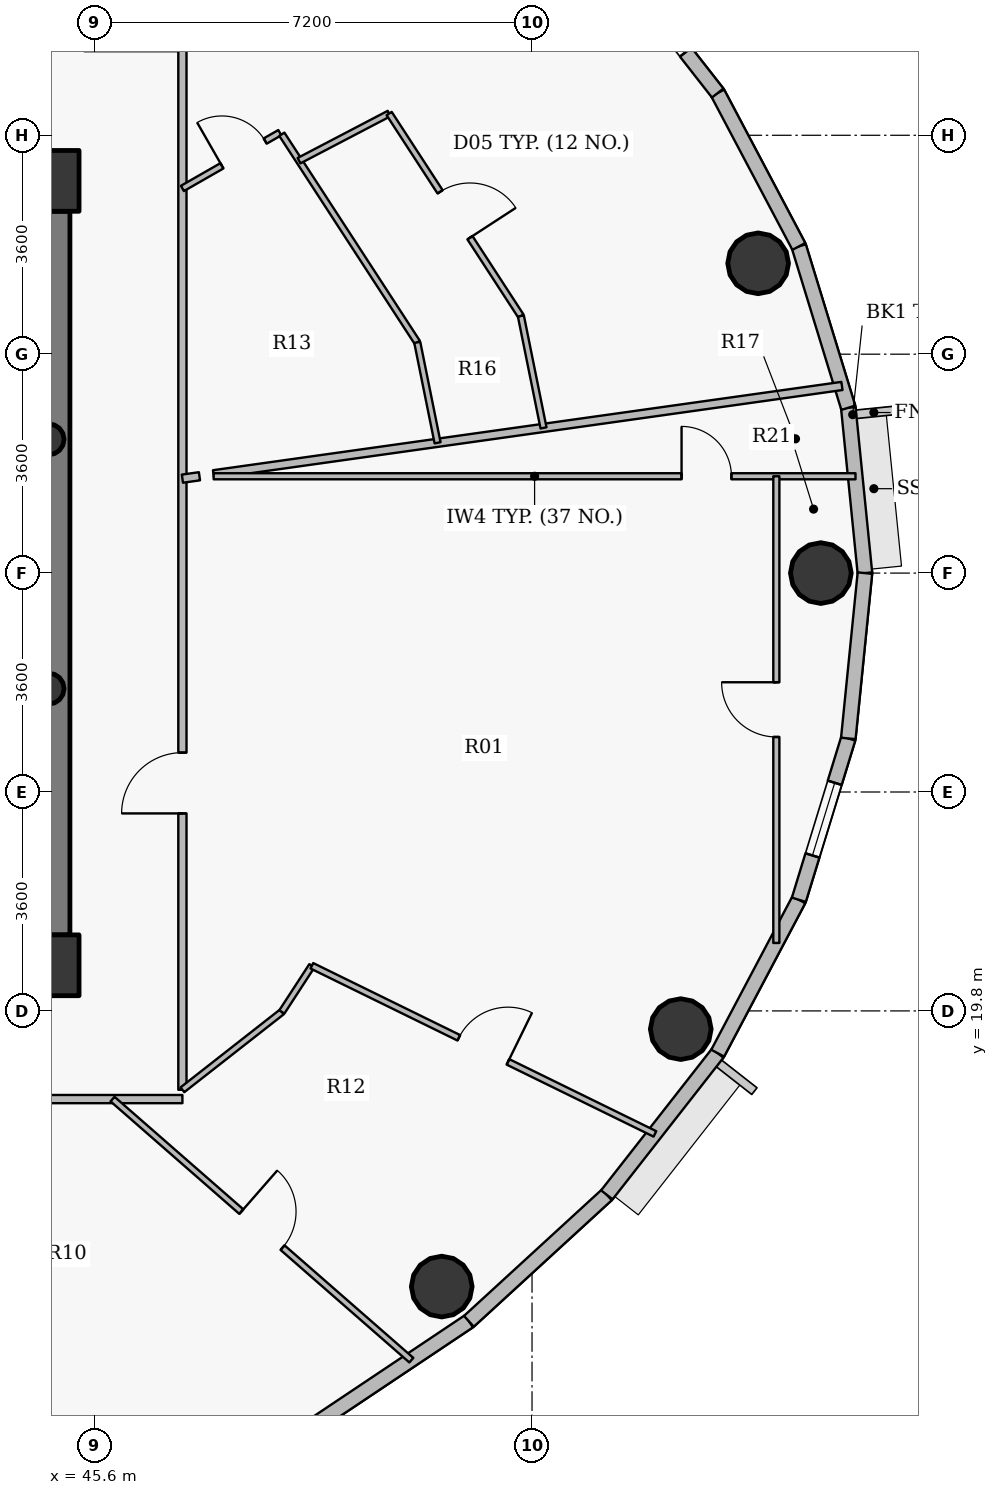
"""IFC4 building model, lengths in metres.
Left out: names, types, materials, properties, quantities, classifications, styles, units other than length and angle.
Written with IfcOpenShell. Run it as: python <this file> out.ifc"""

import sys

from ifc_helpers import new_model, si_unit, direction, frame, frame_2d, origin, origin_2d, place, context, subcontext, project, spatial, rectangle, hollow_circle, extrude, source, transform, mapped, element, fill, save


model = new_model("IFC4")
c1 = context("Model", 3, precision=1e-05, world=origin(), true_north=direction((0.0, 1.0)))
c2 = subcontext(c1, "Body", "Model", "MODEL_VIEW")
j1 = project(units=[si_unit("LENGTHUNIT", "METRE"), si_unit("PLANEANGLEUNIT", "RADIAN")], contexts=[c1])
p1 = place(None, origin())
s1 = spatial("IfcSite", under=j1, at=p1, CompositionType="ELEMENT")
p2 = place(p1, origin())
s2 = spatial("IfcBuilding", under=s1, at=p2, CompositionType="ELEMENT")
p3 = place(p2, frame((0.0, 0.0, 276.75)))
s3 = spatial("IfcBuildingStorey", under=s2, at=p3, CompositionType="ELEMENT", Elevation=276.75)
for number, where, z_axis, x_axis in (
    (1, (44.85, 20.55, 0.0), (0.0, 0.0, 1.0), (1.0, 0.0, 0.0)),
    (2, (44.85, 33.45, 0.0), (0.0, 0.0, 1.0), (1.0, 0.0, 0.0)),
):
    element("IfcColumn", number, at=place(p3, frame(where, z_axis=z_axis, x_axis=x_axis)), inside=s3, PredefinedType="COLUMN", context=c2, shape_type="SweptSolid", body=[
        extrude(rectangle(XDim=1.0, YDim=1.0, at=origin_2d()), origin(), (0.0, 0.0, 1.0), 3.75),
    ])
p4 = place(p3, frame((44.85, 32.95, 0.0), z_axis=(0.0, 0.0, 1.0), x_axis=(0.0, -1.0, 0.0)))
e3 = element("IfcWall", 3, at=p4, inside=s3, PredefinedType="SHEAR", context=c2, shape_type="SweptSolid", body=[
    extrude(rectangle(XDim=11.9, YDim=0.7, at=frame_2d((5.95, 0.0))), origin(), (0.0, 0.0, 1.0), 3.05),
])
for number, where, z_axis, x_axis in (
    (4, (57.55, 27.0, 0.0), (0.0, 0.0, 1.0), (1.0, 0.0, 0.0)),
    (5, (56.519, 32.094, 0.0), (0.0, 0.0, 1.0), (1.0, 0.0, 0.0)),
    (6, (51.315, 15.267, 0.0), (0.0, 0.0, 1.0), (1.0, 0.0, 0.0)),
    (7, (55.246, 19.5, 0.0), (0.0, 0.0, 1.0), (1.0, 0.0, 0.0)),
):
    element("IfcColumn", number, at=place(p3, frame(where, z_axis=z_axis, x_axis=x_axis)), inside=s3, PredefinedType="COLUMN", context=c2, shape_type="SweptSolid", body=[
        extrude(hollow_circle(Radius=0.5, WallThickness=0.032, at=origin_2d()), origin(), (0.0, 0.0, 1.0), 3.75),
    ])
for number, where, z_axis, x_axis in (
    (8, (44.85, 25.1, 0.0), (0.0, 0.0, 1.0), (1.0, 0.0, 0.0)),
    (9, (44.85, 29.2, 0.0), (0.0, 0.0, 1.0), (1.0, 0.0, 0.0)),
):
    element("IfcColumn", number, at=place(p3, frame(where, z_axis=z_axis, x_axis=x_axis)), inside=s3, PredefinedType="COLUMN", context=c2, shape_type="SweptSolid", body=[
        extrude(hollow_circle(Radius=0.254, WallThickness=0.02, at=origin_2d()), origin(), (0.0, 0.0, 1.0), 3.75),
    ])
p5 = place(p3, frame((58.002, 29.719, 0.0), z_axis=(0.0, 0.0, 1.0), x_axis=(0.099972526841, -0.99499019788, 0.0)))
e10 = element("IfcWall", 10, at=p5, inside=s3, PredefinedType="SOLIDWALL", context=c2, shape_type="SweptSolid", body=[
    extrude(rectangle(XDim=2.733, YDim=0.24, at=frame_2d((1.366, 0.0))), origin(), (0.0, 0.0, 1.0), 3.5),
])
p6 = place(p3, frame((57.188, 32.372, 0.0), z_axis=(0.0, 0.0, 1.0), x_axis=(0.2931213403, -0.956075248012, 0.0)))
e11 = element("IfcWall", 11, at=p6, inside=s3, PredefinedType="SOLIDWALL", context=c2, shape_type="SweptSolid", body=[
    extrude(rectangle(XDim=2.775, YDim=0.24, at=frame_2d((1.388, 0.0))), origin(), (0.0, 0.0, 1.0), 3.5),
])
p7 = place(p3, frame((55.854, 34.895, 0.0), z_axis=(0.0, 0.0, 1.0), x_axis=(0.467628269026, -0.883925224218, 0.0)))
e12 = element("IfcWall", 12, at=p7, inside=s3, PredefinedType="SOLIDWALL", context=c2, shape_type="SweptSolid", body=[
    extrude(rectangle(XDim=2.854, YDim=0.24, at=frame_2d((1.427, 0.0))), origin(), (0.0, 0.0, 1.0), 3.5),
])
p8 = place(p3, frame((54.03, 37.225, 0.0), z_axis=(0.0, 0.0, 1.0), x_axis=(0.616337186556, -0.787482363275, 0.0)))
e13 = element("IfcWall", 13, at=p8, inside=s3, PredefinedType="SOLIDWALL", context=c2, shape_type="SweptSolid", body=[
    extrude(rectangle(XDim=2.958, YDim=0.24, at=frame_2d((1.479, 0.0))), origin(), (0.0, 0.0, 1.0), 3.5),
])
p9 = place(p8, frame((0.854, 0.0, 0.9)))
e14 = element("IfcOpeningElement", 14, at=p9, cuts=e13, PredefinedType="OPENING", context=c2, shape_type="SweptSolid", body=[
    extrude(rectangle(XDim=1.25, YDim=1.65, at=origin_2d()), frame((0.625, 0.13, 0.825), z_axis=(0.0, -1.0, 0.0), x_axis=(1.0, 0.0, 0.0)), (0.0, 0.0, 1.0), 0.26),
])
p10 = place(p3, frame((51.762, 14.696, 0.0), z_axis=(0.0, 0.0, 1.0), x_axis=(-0.831250592635, -0.55589787933, 0.0)))
e15 = element("IfcWall", 15, at=p10, inside=s3, PredefinedType="SOLIDWALL", context=c2, shape_type="SweptSolid", body=[
    extrude(rectangle(XDim=3.197, YDim=0.24, at=frame_2d((1.599, 0.0))), origin(), (0.0, 0.0, 1.0), 3.5),
])
p11 = place(p3, frame((54.03, 16.775, 0.0), z_axis=(0.0, 0.0, 1.0), x_axis=(-0.737068506972, -0.675818034703, 0.0)))
e16 = element("IfcWall", 16, at=p11, inside=s3, PredefinedType="SOLIDWALL", context=c2, shape_type="SweptSolid", body=[
    extrude(rectangle(XDim=3.077, YDim=0.24, at=frame_2d((1.539, 0.0))), origin(), (0.0, 0.0, 1.0), 3.5),
])
p12 = place(p3, frame((55.854, 19.105, 0.0), z_axis=(0.0, 0.0, 1.0), x_axis=(-0.616337186556, -0.787482363275, 0.0)))
e17 = element("IfcWall", 17, at=p12, inside=s3, PredefinedType="SOLIDWALL", context=c2, shape_type="SweptSolid", body=[
    extrude(rectangle(XDim=2.958, YDim=0.24, at=frame_2d((1.479, 0.0))), origin(), (0.0, 0.0, 1.0), 3.5),
])
p13 = place(p3, frame((57.188, 21.628, 0.0), z_axis=(0.0, 0.0, 1.0), x_axis=(-0.467628269026, -0.883925224218, 0.0)))
e18 = element("IfcWall", 18, at=p13, inside=s3, PredefinedType="SOLIDWALL", context=c2, shape_type="SweptSolid", body=[
    extrude(rectangle(XDim=2.854, YDim=0.24, at=frame_2d((1.427, 0.0))), origin(), (0.0, 0.0, 1.0), 3.5),
])
p14 = place(p3, frame((58.002, 24.281, 0.0), z_axis=(0.0, 0.0, 1.0), x_axis=(-0.2931213403, -0.956075248012, 0.0)))
e19 = element("IfcWall", 19, at=p14, inside=s3, PredefinedType="SOLIDWALL", context=c2, shape_type="SweptSolid", body=[
    extrude(rectangle(XDim=2.775, YDim=0.24, at=frame_2d((1.388, 0.0))), origin(), (0.0, 0.0, 1.0), 3.5),
])
p15 = place(p14, frame((0.763, 0.0, 0.9)))
e20 = element("IfcOpeningElement", 20, at=p15, cuts=e19, PredefinedType="OPENING", context=c2, shape_type="SweptSolid", body=[
    extrude(rectangle(XDim=1.25, YDim=1.65, at=origin_2d()), frame((0.625, 0.13, 0.825), z_axis=(0.0, -1.0, 0.0), x_axis=(1.0, 0.0, 0.0)), (0.0, 0.0, 1.0), 0.26),
])
p16 = place(p3, frame((58.275, 27.0, 0.0), z_axis=(0.0, 0.0, 1.0), x_axis=(-0.099972526841, -0.99499019788, 0.0)))
e21 = element("IfcWall", 21, at=p16, inside=s3, PredefinedType="SOLIDWALL", context=c2, shape_type="SweptSolid", body=[
    extrude(rectangle(XDim=2.733, YDim=0.24, at=frame_2d((1.366, 0.0))), origin(), (0.0, 0.0, 1.0), 3.5),
])
p17 = place(p3, frame((36.95, 18.35, 0.0), z_axis=(0.0, 0.0, 1.0), x_axis=(1.0, 0.0, 0.0)))
e22 = element("IfcWall", 22, at=p17, inside=s3, PredefinedType="PARTITIONING", context=c2, shape_type="SweptSolid", body=[
    extrude(rectangle(XDim=10.1, YDim=0.135, at=frame_2d((5.05, 0.0))), origin(), (0.0, 0.0, 1.0), 3.035),
])
p18 = place(p17, frame((1.521, 0.0, 0.0)))
e23 = element("IfcOpeningElement", 23, at=p18, cuts=e22, PredefinedType="OPENING", context=c2, shape_type="SweptSolid", body=[
    extrude(rectangle(XDim=1.0, YDim=2.15, at=origin_2d()), frame((0.5, 0.078, 1.075), z_axis=(0.0, -1.0, 0.0), x_axis=(1.0, 0.0, 0.0)), (0.0, 0.0, 1.0), 0.155),
])
p19 = place(p3, frame((40.952, 18.35, 0.0), z_axis=(0.0, 0.0, 1.0), x_axis=(0.496803688517, -0.867862947173, 0.0)))
e24 = element("IfcWall", 24, at=p19, inside=s3, PredefinedType="PARTITIONING", context=c2, shape_type="SweptSolid", body=[
    extrude(rectangle(XDim=8.304, YDim=0.135, at=frame_2d((4.152, 0.0))), origin(), (0.0, 0.0, 1.0), 2.985),
])
p20 = place(p3, frame((45.901, 18.35, 0.0), z_axis=(0.0, 0.0, 1.0), x_axis=(0.753056223084, -0.657956172457, 0.0)))
e25 = element("IfcWall", 25, at=p20, inside=s3, PredefinedType="PARTITIONING", context=c2, shape_type="SweptSolid", body=[
    extrude(rectangle(XDim=6.526, YDim=0.1, at=frame_2d((3.263, 0.0))), origin(), (0.0, 0.0, 1.0), 2.985),
])
p21 = place(p20, frame((2.813, 0.0, 0.0)))
e26 = element("IfcOpeningElement", 26, at=p21, cuts=e25, PredefinedType="OPENING", context=c2, shape_type="SweptSolid", body=[
    extrude(rectangle(XDim=0.9, YDim=2.1, at=origin_2d()), frame((0.45, 0.06, 1.05), z_axis=(0.0, -1.0, 0.0), x_axis=(1.0, 0.0, 0.0)), (0.0, 0.0, 1.0), 0.12),
])
p22 = place(p3, frame((47.05, 18.503, 0.0), z_axis=(0.0, 0.0, 1.0), x_axis=(0.0, 1.0, 0.0)))
e27 = element("IfcWall", 27, at=p22, inside=s3, PredefinedType="PARTITIONING", context=c2, shape_type="SweptSolid", body=[
    extrude(rectangle(XDim=17.147, YDim=0.135, at=frame_2d((8.574, 0.0))), origin(), (0.0, 0.0, 1.0), 3.035),
])
p23 = place(p22, frame((4.545, 0.0, 0.0)))
e28 = element("IfcOpeningElement", 28, at=p23, cuts=e27, PredefinedType="OPENING", context=c2, shape_type="SweptSolid", body=[
    extrude(rectangle(XDim=1.0, YDim=2.15, at=origin_2d()), frame((0.5, 0.078, 1.075), z_axis=(0.0, -1.0, 0.0), x_axis=(1.0, 0.0, 0.0)), (0.0, 0.0, 1.0), 0.155),
])
p24 = place(p3, frame((47.05, 18.503, 0.0), z_axis=(0.0, 0.0, 1.0), x_axis=(0.787328855274, 0.616533270516, 0.0)))
e29 = element("IfcWall", 29, at=p24, inside=s3, PredefinedType="PARTITIONING", context=c2, shape_type="SweptSolid", body=[
    extrude(rectangle(XDim=2.077, YDim=0.1, at=frame_2d((1.039, 0.0))), origin(), (0.0, 0.0, 1.0), 3.035),
])
p25 = place(p3, frame((47.05, 28.553, 0.0), z_axis=(0.0, 0.0, 1.0), x_axis=(0.990308552968, 0.138884736087, 0.0)))
e30 = element("IfcWall", 30, at=p25, inside=s3, PredefinedType="PARTITIONING", context=c2, shape_type="SweptSolid", body=[
    extrude(rectangle(XDim=0.283, YDim=0.135, at=frame_2d((0.142, 0.0))), origin(), (0.0, 0.0, 1.0), 3.5),
])
p26 = place(p3, frame((47.05, 33.326, 0.0), z_axis=(0.0, 0.0, 1.0), x_axis=(0.867827775188, 0.496865125172, 0.0)))
e31 = element("IfcWall", 31, at=p26, inside=s3, PredefinedType="PARTITIONING", context=c2, shape_type="SweptSolid", body=[
    extrude(rectangle(XDim=1.846, YDim=0.1, at=frame_2d((0.923, 0.0))), origin(), (0.0, 0.0, 1.0), 3.5),
])
p27 = place(p26, frame((0.749, 0.0, 0.0)))
e32 = element("IfcOpeningElement", 32, at=p27, cuts=e31, PredefinedType="OPENING", context=c2, shape_type="SweptSolid", body=[
    extrude(rectangle(XDim=0.82, YDim=2.1, at=origin_2d()), frame((0.41, 0.06, 1.05), z_axis=(0.0, -1.0, 0.0), x_axis=(1.0, 0.0, 0.0)), (0.0, 0.0, 1.0), 0.12),
])
p28 = place(p3, frame((47.562, 28.625, 0.0), z_axis=(0.0, 0.0, 1.0), x_axis=(0.990269276455, 0.139164507362, 0.0)))
e33 = element("IfcWall", 33, at=p28, inside=s3, PredefinedType="PARTITIONING", context=c2, shape_type="SweptSolid", body=[
    extrude(rectangle(XDim=10.437, YDim=0.135, at=frame_2d((5.218, 0.0))), origin(), (0.0, 0.0, 1.0), 2.985),
])
p29 = place(p3, frame((47.564, 28.592, 0.0), z_axis=(0.0, 0.0, 1.0), x_axis=(1.0, 0.0, 0.0)))
e34 = element("IfcWall", 34, at=p29, inside=s3, PredefinedType="PARTITIONING", context=c2, shape_type="SweptSolid", body=[
    extrude(rectangle(XDim=10.555, YDim=0.1, at=frame_2d((5.278, 0.0))), origin(), (0.0, 0.0, 1.0), 2.985),
])
p30 = place(p29, frame((7.695, 0.0, 0.0)))
e35 = element("IfcOpeningElement", 35, at=p30, cuts=e34, PredefinedType="OPENING", context=c2, shape_type="SweptSolid", body=[
    extrude(rectangle(XDim=0.82, YDim=2.1, at=origin_2d()), frame((0.41, 0.06, 1.05), z_axis=(0.0, -1.0, 0.0), x_axis=(1.0, 0.0, 0.0)), (0.0, 0.0, 1.0), 0.12),
])
p31 = place(p3, frame((48.685, 19.783, 0.0), z_axis=(0.0, 0.0, 1.0), x_axis=(0.545519027777, 0.838098437138, 0.0)))
e36 = element("IfcWall", 36, at=p31, inside=s3, PredefinedType="PARTITIONING", context=c2, shape_type="SweptSolid", body=[
    extrude(rectangle(XDim=0.905, YDim=0.1, at=frame_2d((0.453, 0.0))), origin(), (0.0, 0.0, 1.0), 3.5),
])
p32 = place(p3, frame((48.685, 34.217, 0.0), z_axis=(0.0, 0.0, 1.0), x_axis=(0.54540855562, -0.8381703332, 0.0)))
e37 = element("IfcWall", 37, at=p32, inside=s3, PredefinedType="PARTITIONING", context=c2, shape_type="SweptSolid", body=[
    extrude(rectangle(XDim=4.084, YDim=0.1, at=frame_2d((2.042, 0.0))), origin(), (0.0, 0.0, 1.0), 3.035),
])
p33 = place(p3, frame((48.968, 33.782, 0.0), z_axis=(0.0, 0.0, 1.0), x_axis=(0.886102824681, 0.463488709779, 0.0)))
e38 = element("IfcWall", 38, at=p33, inside=s3, PredefinedType="PARTITIONING", context=c2, shape_type="SweptSolid", body=[
    extrude(rectangle(XDim=1.672, YDim=0.1, at=frame_2d((0.836, 0.0))), origin(), (0.0, 0.0, 1.0), 3.5),
])
p34 = place(p3, frame((49.179, 20.542, 0.0), z_axis=(0.0, 0.0, 1.0), x_axis=(0.89799659679, -0.440002400167, 0.0)))
e39 = element("IfcWall", 39, at=p34, inside=s3, PredefinedType="PARTITIONING", context=c2, shape_type="SweptSolid", body=[
    extrude(rectangle(XDim=6.283, YDim=0.1, at=frame_2d((3.141, 0.0))), origin(), (0.0, 0.0, 1.0), 2.985),
])
p35 = place(p34, frame((2.691, 0.0, 0.0)))
e40 = element("IfcOpeningElement", 40, at=p35, cuts=e39, PredefinedType="OPENING", context=c2, shape_type="SweptSolid", body=[
    extrude(rectangle(XDim=0.9, YDim=2.1, at=origin_2d()), frame((0.45, 0.06, 1.05), z_axis=(0.0, -1.0, 0.0), x_axis=(1.0, 0.0, 0.0)), (0.0, 0.0, 1.0), 0.12),
])
p36 = place(p3, frame((50.45, 34.558, 0.0), z_axis=(0.0, 0.0, 1.0), x_axis=(0.545448348881, -0.838144437853, 0.0)))
e41 = element("IfcWall", 41, at=p36, inside=s3, PredefinedType="PARTITIONING", context=c2, shape_type="SweptSolid", body=[
    extrude(rectangle(XDim=3.973, YDim=0.1, at=frame_2d((1.986, 0.0))), origin(), (0.0, 0.0, 1.0), 3.035),
])
p37 = place(p36, frame((1.536, 0.0, 0.0)))
e42 = element("IfcOpeningElement", 42, at=p37, cuts=e41, PredefinedType="OPENING", context=c2, shape_type="SweptSolid", body=[
    extrude(rectangle(XDim=0.9, YDim=2.1, at=origin_2d()), frame((0.45, 0.06, 1.05), z_axis=(0.0, -1.0, 0.0), x_axis=(1.0, 0.0, 0.0)), (0.0, 0.0, 1.0), 0.12),
])
p38 = place(p3, frame((50.913, 30.794, 0.0), z_axis=(0.0, 0.0, 1.0), x_axis=(0.198233557602, -0.980154812588, 0.0)))
e43 = element("IfcWall", 43, at=p38, inside=s3, PredefinedType="PARTITIONING", context=c2, shape_type="SweptSolid", body=[
    extrude(rectangle(XDim=1.685, YDim=0.1, at=frame_2d((0.842, 0.0))), origin(), (0.0, 0.0, 1.0), 3.035),
])
p39 = place(p3, frame((52.617, 31.228, 0.0), z_axis=(0.0, 0.0, 1.0), x_axis=(0.198191443997, -0.980163329005, 0.0)))
e44 = element("IfcWall", 44, at=p39, inside=s3, PredefinedType="PARTITIONING", context=c2, shape_type="SweptSolid", body=[
    extrude(rectangle(XDim=1.877, YDim=0.1, at=frame_2d((0.939, 0.0))), origin(), (0.0, 0.0, 1.0), 3.035),
])
p40 = place(p3, frame((56.818, 20.917, 0.0), z_axis=(0.0, 0.0, 1.0), x_axis=(0.0, 1.0, 0.0)))
e45 = element("IfcWall", 45, at=p40, inside=s3, PredefinedType="PARTITIONING", context=c2, shape_type="SweptSolid", body=[
    extrude(rectangle(XDim=7.675, YDim=0.1, at=frame_2d((3.837, 0.0))), origin(), (0.0, 0.0, 1.0), 2.985),
])
p41 = place(p40, frame((3.388, 0.0, 0.0)))
e46 = element("IfcOpeningElement", 46, at=p41, cuts=e45, PredefinedType="OPENING", context=c2, shape_type="SweptSolid", body=[
    extrude(rectangle(XDim=0.9, YDim=2.1, at=origin_2d()), frame((0.45, 0.06, 1.05), z_axis=(0.0, -1.0, 0.0), x_axis=(1.0, 0.0, 0.0)), (0.0, 0.0, 1.0), 0.12),
])
for number, where, z_axis, x_axis in (
    (47, (45.2, 33.8, 0.0), (0.0, 0.0, 1.0), (-1.0, 0.0, 0.0)),
    (48, (44.36, 20.2, 0.0), (0.0, 0.0, 1.0), (1.0, 0.0, 0.0)),
):
    element("IfcWall", number, at=place(p3, frame(where, z_axis=z_axis, x_axis=x_axis)), inside=s3, PredefinedType="PARTITIONING", context=c2, shape_type="SweptSolid", body=[
        extrude(rectangle(XDim=0.84, YDim=0.135, at=frame_2d((0.42, 0.0))), origin(), (0.0, 0.0, 1.0), 3.035),
    ])
for number, where, z_axis, x_axis in (
    (49, (45.2, 20.508, 0.0), (0.0, 0.0, 1.0), (0.0, 1.0, 0.0)),
    (50, (45.2, 32.96, 0.0), (0.0, 0.0, 1.0), (0.0, 1.0, 0.0)),
):
    element("IfcWall", number, at=place(p3, frame(where, z_axis=z_axis, x_axis=x_axis)), inside=s3, PredefinedType="PARTITIONING", context=c2, shape_type="SweptSolid", body=[
        extrude(rectangle(XDim=0.532, YDim=0.135, at=frame_2d((0.266, 0.0))), origin(), (0.0, 0.0, 1.0), 3.5),
    ])
m1 = source(origin(), c2, "Body", "SweptSolid", [
    extrude(rectangle(XDim=1.25, YDim=1.65, at=origin_2d()), frame((0.625, 0.03, 0.825), z_axis=(0.0, -1.0, 0.0), x_axis=(1.0, 0.0, 0.0)), (0.0, 0.0, 1.0), 0.06),
])
p42 = place(p9, origin())
e51 = element("IfcWindow", 51, at=p42, inside=s3, PartitioningType="SINGLE_PANEL", PredefinedType="WINDOW", context=c2, shape_type="MappedRepresentation", body=[
    mapped(m1, transform((0.0, 0.0, 0.0), x_axis=(1.0, 0.0, 0.0), y_axis=(0.0, 1.0, 0.0), z_axis=(0.0, 0.0, 1.0), scale=1.0)),
])
fill(e14, e51)
p43 = place(p15, origin())
e52 = element("IfcWindow", 52, at=p43, inside=s3, PartitioningType="SINGLE_PANEL", PredefinedType="WINDOW", context=c2, shape_type="MappedRepresentation", body=[
    mapped(m1, transform((0.0, 0.0, 0.0), x_axis=(1.0, 0.0, 0.0), y_axis=(0.0, 1.0, 0.0), z_axis=(0.0, 0.0, 1.0), scale=1.0)),
])
fill(e20, e52)
m2 = source(origin(), c2, "Body", "SweptSolid", [
    extrude(rectangle(XDim=0.82, YDim=2.1, at=origin_2d()), frame((0.41, 0.025, 1.05), z_axis=(0.0, -1.0, 0.0), x_axis=(1.0, 0.0, 0.0)), (0.0, 0.0, 1.0), 0.05),
])
p44 = place(p27, origin())
e53 = element("IfcDoor", 53, at=p44, inside=s3, OperationType="SINGLE_SWING_LEFT", PredefinedType="DOOR", context=c2, shape_type="MappedRepresentation", body=[
    mapped(m2, transform((0.0, 0.0, 0.0), x_axis=(1.0, 0.0, 0.0), y_axis=(0.0, 1.0, 0.0), z_axis=(0.0, 0.0, 1.0), scale=1.0)),
])
fill(e32, e53)
m3 = source(origin(), c2, "Body", "SweptSolid", [
    extrude(rectangle(XDim=0.9, YDim=2.1, at=origin_2d()), frame((0.45, 0.025, 1.05), z_axis=(0.0, -1.0, 0.0), x_axis=(1.0, 0.0, 0.0)), (0.0, 0.0, 1.0), 0.05),
])
p45 = place(p37, origin())
e54 = element("IfcDoor", 54, at=p45, inside=s3, OperationType="SINGLE_SWING_RIGHT", PredefinedType="DOOR", context=c2, shape_type="MappedRepresentation", body=[
    mapped(m3, transform((0.0, 0.0, 0.0), x_axis=(1.0, 0.0, 0.0), y_axis=(0.0, 1.0, 0.0), z_axis=(0.0, 0.0, 1.0), scale=1.0)),
])
fill(e42, e54)
m4 = source(origin(), c2, "Body", "SweptSolid", [
    extrude(rectangle(XDim=1.0, YDim=2.15, at=origin_2d()), frame((0.5, 0.025, 1.075), z_axis=(0.0, -1.0, 0.0), x_axis=(1.0, 0.0, 0.0)), (0.0, 0.0, 1.0), 0.05),
])
p46 = place(p23, origin())
e55 = element("IfcDoor", 55, at=p46, inside=s3, OperationType="SINGLE_SWING_LEFT", PredefinedType="DOOR", context=c2, shape_type="MappedRepresentation", body=[
    mapped(m4, transform((0.0, 0.0, 0.0), x_axis=(1.0, 0.0, 0.0), y_axis=(0.0, 1.0, 0.0), z_axis=(0.0, 0.0, 1.0), scale=1.0)),
])
fill(e28, e55)
p47 = place(p35, origin())
e56 = element("IfcDoor", 56, at=p47, inside=s3, OperationType="SINGLE_SWING_RIGHT", PredefinedType="DOOR", context=c2, shape_type="MappedRepresentation", body=[
    mapped(m3, transform((0.0, 0.0, 0.0), x_axis=(1.0, 0.0, 0.0), y_axis=(0.0, 1.0, 0.0), z_axis=(0.0, 0.0, 1.0), scale=1.0)),
])
fill(e40, e56)
p48 = place(p30, origin())
e57 = element("IfcDoor", 57, at=p48, inside=s3, OperationType="SINGLE_SWING_LEFT", PredefinedType="DOOR", context=c2, shape_type="MappedRepresentation", body=[
    mapped(m2, transform((0.0, 0.0, 0.0), x_axis=(1.0, 0.0, 0.0), y_axis=(0.0, 1.0, 0.0), z_axis=(0.0, 0.0, 1.0), scale=1.0)),
])
fill(e35, e57)
p49 = place(p41, origin())
e58 = element("IfcDoor", 58, at=p49, inside=s3, OperationType="SINGLE_SWING_RIGHT", PredefinedType="DOOR", context=c2, shape_type="MappedRepresentation", body=[
    mapped(m3, transform((0.0, 0.0, 0.0), x_axis=(1.0, 0.0, 0.0), y_axis=(0.0, 1.0, 0.0), z_axis=(0.0, 0.0, 1.0), scale=1.0)),
])
fill(e46, e58)
p50 = place(p21, origin())
e59 = element("IfcDoor", 59, at=p50, inside=s3, OperationType="SINGLE_SWING_LEFT", PredefinedType="DOOR", context=c2, shape_type="MappedRepresentation", body=[
    mapped(m3, transform((0.0, 0.0, 0.0), x_axis=(1.0, 0.0, 0.0), y_axis=(0.0, 1.0, 0.0), z_axis=(0.0, 0.0, 1.0), scale=1.0)),
])
fill(e26, e59)
save(model, sys.argv[1])
